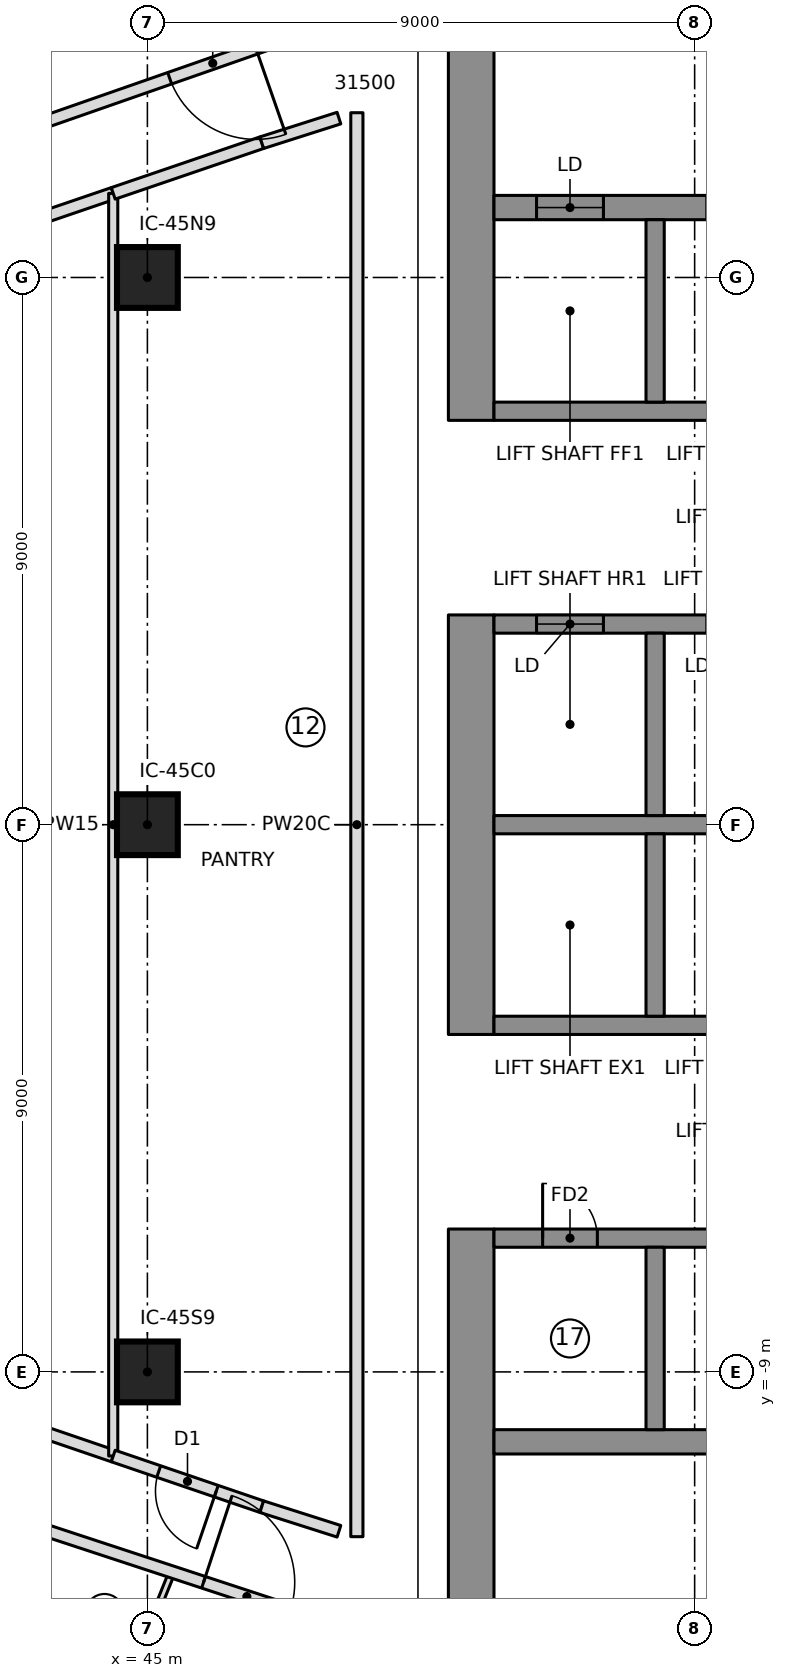
"""IFC4 building model, lengths in metres.
Left out: names, types, materials, properties, quantities, classifications, styles, units other than length and angle.
Written with IfcOpenShell. Run it as: python <this file> out.ifc"""

import sys

from ifc_helpers import new_model, si_unit, direction, frame, frame_2d, origin, origin_2d, place, context, subcontext, project, spatial, rectangle, extrude, element, fill, save


model = new_model("IFC4")
c1 = context("Model", 3, precision=1e-05, world=origin(), true_north=direction((0.0, 1.0)))
c2 = subcontext(c1, "Body", "Model", "MODEL_VIEW")
j1 = project(units=[si_unit("LENGTHUNIT", "METRE"), si_unit("PLANEANGLEUNIT", "RADIAN")], contexts=[c1])
p1 = place(None, origin())
s1 = spatial("IfcSite", under=j1, at=p1, CompositionType="ELEMENT")
p2 = place(p1, origin())
s2 = spatial("IfcBuilding", under=s1, at=p2, CompositionType="ELEMENT")
p3 = place(p2, frame((0.0, 0.0, 200.35)))
s3 = spatial("IfcBuildingStorey", under=s2, at=p3, CompositionType="ELEMENT", Elevation=200.35)
p4 = place(p3, frame((50.325, 6.65, 0.0), z_axis=(0.0, 0.0, 1.0), x_axis=(0.0, 1.0, 0.0)))
e1 = element("IfcWall", 1, at=p4, inside=s3, PredefinedType="SHEAR", context=c2, shape_type="SweptSolid", body=[
    extrude(rectangle(XDim=9.85, YDim=0.75, at=frame_2d((4.925, 0.0))), origin(), (0.0, 0.0, 1.0), 3.55),
])
p5 = place(p4, frame((6.5, 0.0, 0.0)))
e2 = element("IfcOpeningElement", 2, at=p5, cuts=e1, PredefinedType="OPENING", context=c2, shape_type="SweptSolid", body=[
    extrude(rectangle(XDim=1.1, YDim=2.1, at=frame_2d((0.55, 1.05))), frame((0.0, 0.385, 0.0), z_axis=(0.0, -1.0, 0.0), x_axis=(1.0, 0.0, 0.0)), (0.0, 0.0, 1.0), 0.77),
])
p6 = place(p3, frame((50.325, -3.45, 0.0), z_axis=(0.0, 0.0, 1.0), x_axis=(0.0, 1.0, 0.0)))
e3 = element("IfcWall", 3, at=p6, inside=s3, PredefinedType="SHEAR", context=c2, shape_type="SweptSolid", body=[
    extrude(rectangle(XDim=6.9, YDim=0.75, at=frame_2d((3.45, 0.0))), origin(), (0.0, 0.0, 1.0), 3.55),
])
p7 = place(p3, frame((50.325, -16.5, 0.0), z_axis=(0.0, 0.0, 1.0), x_axis=(0.0, 1.0, 0.0)))
e4 = element("IfcWall", 4, at=p7, inside=s3, PredefinedType="SHEAR", context=c2, shape_type="SweptSolid", body=[
    extrude(rectangle(XDim=9.85, YDim=0.75, at=frame_2d((4.925, 0.0))), origin(), (0.0, 0.0, 1.0), 3.55),
])
p8 = place(p7, frame((2.25, 0.0, 0.0)))
e5 = element("IfcOpeningElement", 5, at=p8, cuts=e4, PredefinedType="OPENING", context=c2, shape_type="SweptSolid", body=[
    extrude(rectangle(XDim=1.1, YDim=2.1, at=frame_2d((0.55, 1.05))), frame((0.0, 0.385, 0.0), z_axis=(0.0, -1.0, 0.0), x_axis=(1.0, 0.0, 0.0)), (0.0, 0.0, 1.0), 0.77),
])
p9 = place(p3, frame((50.7, 10.15, 0.0), z_axis=(0.0, 0.0, 1.0), x_axis=(1.0, 0.0, 0.0)))
e6 = element("IfcWall", 6, at=p9, inside=s3, PredefinedType="SHEAR", context=c2, shape_type="SweptSolid", body=[
    extrude(rectangle(XDim=13.02, YDim=0.4, at=frame_2d((6.51, 0.0))), origin(), (0.0, 0.0, 1.0), 3.55),
])
p10 = place(p9, frame((0.7, 0.0, 0.0)))
e7 = element("IfcOpeningElement", 7, at=p10, cuts=e6, PredefinedType="OPENING", context=c2, shape_type="SweptSolid", body=[
    extrude(rectangle(XDim=1.1, YDim=2.1, at=frame_2d((0.55, 1.05))), frame((0.0, 0.21, 0.0), z_axis=(0.0, -1.0, 0.0), x_axis=(1.0, 0.0, 0.0)), (0.0, 0.0, 1.0), 0.42),
])
p11 = place(p9, frame((3.5, 0.0, 0.0)))
e8 = element("IfcOpeningElement", 8, at=p11, cuts=e6, PredefinedType="OPENING", context=c2, shape_type="SweptSolid", body=[
    extrude(rectangle(XDim=1.1, YDim=2.1, at=frame_2d((0.55, 1.05))), frame((0.0, 0.21, 0.0), z_axis=(0.0, -1.0, 0.0), x_axis=(1.0, 0.0, 0.0)), (0.0, 0.0, 1.0), 0.42),
])
p12 = place(p3, frame((50.7, -10.15, 0.0), z_axis=(0.0, 0.0, 1.0), x_axis=(1.0, 0.0, 0.0)))
e9 = element("IfcWall", 9, at=p12, inside=s3, PredefinedType="SHEAR", context=c2, shape_type="SweptSolid", body=[
    extrude(rectangle(XDim=13.02, YDim=0.4, at=frame_2d((6.51, 0.0))), origin(), (0.0, 0.0, 1.0), 3.55),
])
p13 = place(p3, frame((50.7, 0.0, 0.0), z_axis=(0.0, 0.0, 1.0), x_axis=(1.0, 0.0, 0.0)))
e10 = element("IfcWall", 10, at=p13, inside=s3, PredefinedType="SHEAR", context=c2, shape_type="SweptSolid", body=[
    extrude(rectangle(XDim=10.9, YDim=0.3, at=frame_2d((5.45, 0.0))), origin(), (0.0, 0.0, 1.0), 3.55),
])
p14 = place(p3, frame((50.7, 3.3, 0.0), z_axis=(0.0, 0.0, 1.0), x_axis=(1.0, 0.0, 0.0)))
e11 = element("IfcWall", 11, at=p14, inside=s3, PredefinedType="SHEAR", context=c2, shape_type="SweptSolid", body=[
    extrude(rectangle(XDim=10.9, YDim=0.3, at=frame_2d((5.45, 0.0))), origin(), (0.0, 0.0, 1.0), 3.55),
])
p15 = place(p14, frame((0.7, 0.0, 0.0)))
e12 = element("IfcOpeningElement", 12, at=p15, cuts=e11, PredefinedType="OPENING", context=c2, shape_type="SweptSolid", body=[
    extrude(rectangle(XDim=1.1, YDim=2.1, at=frame_2d((0.55, 1.05))), frame((0.0, 0.16, 0.0), z_axis=(0.0, -1.0, 0.0), x_axis=(1.0, 0.0, 0.0)), (0.0, 0.0, 1.0), 0.32),
])
p16 = place(p14, frame((3.5, 0.0, 0.0)))
e13 = element("IfcOpeningElement", 13, at=p16, cuts=e11, PredefinedType="OPENING", context=c2, shape_type="SweptSolid", body=[
    extrude(rectangle(XDim=1.1, YDim=2.1, at=frame_2d((0.55, 1.05))), frame((0.0, 0.16, 0.0), z_axis=(0.0, -1.0, 0.0), x_axis=(1.0, 0.0, 0.0)), (0.0, 0.0, 1.0), 0.32),
])
p17 = place(p14, frame((6.3, 0.0, 0.0)))
e14 = element("IfcOpeningElement", 14, at=p17, cuts=e11, PredefinedType="OPENING", context=c2, shape_type="SweptSolid", body=[
    extrude(rectangle(XDim=1.1, YDim=2.1, at=frame_2d((0.55, 1.05))), frame((0.0, 0.16, 0.0), z_axis=(0.0, -1.0, 0.0), x_axis=(1.0, 0.0, 0.0)), (0.0, 0.0, 1.0), 0.32),
])
p18 = place(p14, frame((9.1, 0.0, 0.0)))
e15 = element("IfcOpeningElement", 15, at=p18, cuts=e11, PredefinedType="OPENING", context=c2, shape_type="SweptSolid", body=[
    extrude(rectangle(XDim=1.1, YDim=2.1, at=frame_2d((0.55, 1.05))), frame((0.0, 0.16, 0.0), z_axis=(0.0, -1.0, 0.0), x_axis=(1.0, 0.0, 0.0)), (0.0, 0.0, 1.0), 0.32),
])
p19 = place(p3, frame((50.7, 6.8, 0.0), z_axis=(0.0, 0.0, 1.0), x_axis=(1.0, 0.0, 0.0)))
e16 = element("IfcWall", 16, at=p19, inside=s3, PredefinedType="SHEAR", context=c2, shape_type="SweptSolid", body=[
    extrude(rectangle(XDim=10.9, YDim=0.3, at=frame_2d((5.45, 0.0))), origin(), (0.0, 0.0, 1.0), 3.55),
])
p20 = place(p19, frame((6.4, 0.0, 0.0)))
e17 = element("IfcOpeningElement", 17, at=p20, cuts=e16, PredefinedType="OPENING", context=c2, shape_type="SweptSolid", body=[
    extrude(rectangle(XDim=0.9, YDim=2.1, at=frame_2d((0.45, 1.05))), frame((0.0, 0.16, 0.0), z_axis=(0.0, -1.0, 0.0), x_axis=(1.0, 0.0, 0.0)), (0.0, 0.0, 1.0), 0.32),
])
p21 = place(p19, frame((9.2, 0.0, 0.0)))
e18 = element("IfcOpeningElement", 18, at=p21, cuts=e16, PredefinedType="OPENING", context=c2, shape_type="SweptSolid", body=[
    extrude(rectangle(XDim=0.9, YDim=2.1, at=frame_2d((0.45, 1.05))), frame((0.0, 0.16, 0.0), z_axis=(0.0, -1.0, 0.0), x_axis=(1.0, 0.0, 0.0)), (0.0, 0.0, 1.0), 0.32),
])
for number, where, z_axis, x_axis in (
    (19, (53.35, 0.15, 0.0), (0.0, 0.0, 1.0), (0.0, 1.0, 0.0)),
    (20, (53.35, 6.95, 0.0), (0.0, 0.0, 1.0), (0.0, 1.0, 0.0)),
):
    element("IfcWall", number, at=place(p3, frame(where, z_axis=z_axis, x_axis=x_axis)), inside=s3, PredefinedType="SHEAR", context=c2, shape_type="SweptSolid", body=[
        extrude(rectangle(XDim=3.0, YDim=0.3, at=frame_2d((1.5, 0.0))), origin(), (0.0, 0.0, 1.0), 3.55),
    ])
p22 = place(p3, frame((50.7, -3.3, 0.0), z_axis=(0.0, 0.0, 1.0), x_axis=(1.0, 0.0, 0.0)))
e21 = element("IfcWall", 21, at=p22, inside=s3, PredefinedType="SHEAR", context=c2, shape_type="SweptSolid", body=[
    extrude(rectangle(XDim=10.9, YDim=0.3, at=frame_2d((5.45, 0.0))), origin(), (0.0, 0.0, 1.0), 3.55),
])
p23 = place(p22, frame((9.1, 0.0, 0.0)))
e22 = element("IfcOpeningElement", 22, at=p23, cuts=e21, PredefinedType="OPENING", context=c2, shape_type="SweptSolid", body=[
    extrude(rectangle(XDim=1.1, YDim=2.1, at=frame_2d((0.55, 1.05))), frame((0.0, 0.16, 0.0), z_axis=(0.0, -1.0, 0.0), x_axis=(1.0, 0.0, 0.0)), (0.0, 0.0, 1.0), 0.32),
])
p24 = place(p3, frame((50.7, -6.8, 0.0), z_axis=(0.0, 0.0, 1.0), x_axis=(1.0, 0.0, 0.0)))
e23 = element("IfcWall", 23, at=p24, inside=s3, PredefinedType="SHEAR", context=c2, shape_type="SweptSolid", body=[
    extrude(rectangle(XDim=10.9, YDim=0.3, at=frame_2d((5.45, 0.0))), origin(), (0.0, 0.0, 1.0), 3.55),
])
p25 = place(p24, frame((6.3, 0.0, 0.0)))
e24 = element("IfcOpeningElement", 24, at=p25, cuts=e23, PredefinedType="OPENING", context=c2, shape_type="SweptSolid", body=[
    extrude(rectangle(XDim=1.1, YDim=2.1, at=frame_2d((0.55, 1.05))), frame((0.0, 0.16, 0.0), z_axis=(0.0, -1.0, 0.0), x_axis=(1.0, 0.0, 0.0)), (0.0, 0.0, 1.0), 0.32),
])
p26 = place(p24, frame((9.1, 0.0, 0.0)))
e25 = element("IfcOpeningElement", 25, at=p26, cuts=e23, PredefinedType="OPENING", context=c2, shape_type="SweptSolid", body=[
    extrude(rectangle(XDim=1.1, YDim=2.1, at=frame_2d((0.55, 1.05))), frame((0.0, 0.16, 0.0), z_axis=(0.0, -1.0, 0.0), x_axis=(1.0, 0.0, 0.0)), (0.0, 0.0, 1.0), 0.32),
])
p27 = place(p24, frame((0.8, 0.0, 0.0)))
e26 = element("IfcOpeningElement", 26, at=p27, cuts=e23, PredefinedType="OPENING", context=c2, shape_type="SweptSolid", body=[
    extrude(rectangle(XDim=0.9, YDim=2.1, at=frame_2d((0.45, 1.05))), frame((0.0, 0.16, 0.0), z_axis=(0.0, -1.0, 0.0), x_axis=(1.0, 0.0, 0.0)), (0.0, 0.0, 1.0), 0.32),
])
p28 = place(p24, frame((3.6, 0.0, 0.0)))
e27 = element("IfcOpeningElement", 27, at=p28, cuts=e23, PredefinedType="OPENING", context=c2, shape_type="SweptSolid", body=[
    extrude(rectangle(XDim=0.9, YDim=2.1, at=frame_2d((0.45, 1.05))), frame((0.0, 0.16, 0.0), z_axis=(0.0, -1.0, 0.0), x_axis=(1.0, 0.0, 0.0)), (0.0, 0.0, 1.0), 0.32),
])
for number, where, z_axis, x_axis in (
    (28, (53.35, -3.15, 0.0), (0.0, 0.0, 1.0), (0.0, 1.0, 0.0)),
    (29, (53.35, -9.95, 0.0), (0.0, 0.0, 1.0), (0.0, 1.0, 0.0)),
):
    element("IfcWall", number, at=place(p3, frame(where, z_axis=z_axis, x_axis=x_axis)), inside=s3, PredefinedType="SHEAR", context=c2, shape_type="SweptSolid", body=[
        extrude(rectangle(XDim=3.0, YDim=0.3, at=frame_2d((1.5, 0.0))), origin(), (0.0, 0.0, 1.0), 3.55),
    ])
for number, where, z_axis, x_axis in (
    (30, (45.0, -9.0, 0.0), (0.0, 0.0, 1.0), (1.0, 0.0, 0.0)),
    (31, (45.0, 0.0, 0.0), (0.0, 0.0, 1.0), (1.0, 0.0, 0.0)),
    (32, (45.0, 9.0, 0.0), (0.0, 0.0, 1.0), (1.0, 0.0, 0.0)),
):
    element("IfcColumn", number, at=place(p3, frame(where, z_axis=z_axis, x_axis=x_axis)), inside=s3, PredefinedType="COLUMN", context=c2, shape_type="SweptSolid", body=[
        extrude(rectangle(XDim=1.0, YDim=1.0, at=origin_2d()), origin(), (0.0, 0.0, 1.0), 3.55),
    ])
p29 = place(p3, frame((47.113, 12.886, 0.0), z_axis=(0.0, 0.0, 1.0), x_axis=(-0.944155939639, -0.329498955453, 0.0)))
e33 = element("IfcWall", 33, at=p29, inside=s3, PredefinedType="PARTITIONING", context=c2, shape_type="SweptSolid", body=[
    extrude(rectangle(XDim=8.622, YDim=0.2, at=frame_2d((4.311, 0.0))), origin(), (0.0, 0.0, 1.0), 3.25),
])
p30 = place(p29, frame((0.35, 0.0, 0.0)))
e34 = element("IfcOpeningElement", 34, at=p30, cuts=e33, PredefinedType="OPENING", context=c2, shape_type="SweptSolid", body=[
    extrude(rectangle(XDim=1.5, YDim=2.1, at=frame_2d((0.75, 1.05))), frame((0.0, 0.11, 0.0), z_axis=(0.0, -1.0, 0.0), x_axis=(1.0, 0.0, 0.0)), (0.0, 0.0, 1.0), 0.22),
])
p31 = place(p3, frame((45.395, -12.318, 0.0), z_axis=(0.0, 0.0, 1.0), x_axis=(-0.373917841166, -0.927461831052, 0.0)))
e35 = element("IfcWall", 35, at=p31, inside=s3, PredefinedType="PARTITIONING", context=c2, shape_type="SweptSolid", body=[
    extrude(rectangle(XDim=2.281, YDim=0.1, at=frame_2d((1.14, 0.0))), origin(), (0.0, 0.0, 1.0), 3.25),
])
for number, where, z_axis, x_axis in (
    (36, (42.984, 9.887, 0.0), (0.0, 0.0, 1.0), (0.946, 0.323, 0.0)),
    (37, (44.438, -10.383, 0.0), (0.0, 0.0, 1.0), (-0.946, 0.323, 0.0)),
):
    element("IfcWall", number, at=place(p3, frame(where, z_axis=z_axis, x_axis=x_axis)), inside=s3, PredefinedType="PARTITIONING", context=c2, shape_type="SweptSolid", body=[
        extrude(rectangle(XDim=1.536, YDim=0.2, at=frame_2d((0.768, 0.0))), origin(), (0.0, 0.0, 1.0), 3.25),
    ])
p32 = place(p3, frame((44.438, -10.383, 0.0), z_axis=(0.0, 0.0, 1.0), x_axis=(0.0, 1.0, 0.0)))
e38 = element("IfcWall", 38, at=p32, inside=s3, PredefinedType="PARTITIONING", context=c2, shape_type="SweptSolid", body=[
    extrude(rectangle(XDim=20.766, YDim=0.15, at=frame_2d((10.383, 0.0))), origin(), (0.0, 0.0, 1.0), 3.25),
])
p33 = place(p3, frame((46.881, -11.217, 0.0), z_axis=(0.0, 0.0, 1.0), x_axis=(-0.946427432629, 0.322916575554, 0.0)))
e39 = element("IfcWall", 39, at=p33, inside=s3, PredefinedType="PARTITIONING", context=c2, shape_type="SweptSolid", body=[
    extrude(rectangle(XDim=2.581, YDim=0.2, at=frame_2d((1.291, 0.0))), origin(), (0.0, 0.0, 1.0), 3.25),
])
p34 = place(p33, frame((0.791, 0.0, 0.0)))
e40 = element("IfcOpeningElement", 40, at=p34, cuts=e39, PredefinedType="OPENING", context=c2, shape_type="SweptSolid", body=[
    extrude(rectangle(XDim=1.0, YDim=2.1, at=frame_2d((0.5, 1.05))), frame((0.0, 0.11, 0.0), z_axis=(0.0, -1.0, 0.0), x_axis=(1.0, 0.0, 0.0)), (0.0, 0.0, 1.0), 0.22),
])
p35 = place(p3, frame((44.438, 10.383, 0.0), z_axis=(0.0, 0.0, 1.0), x_axis=(0.946427432629, 0.322916575554, 0.0)))
e41 = element("IfcWall", 41, at=p35, inside=s3, PredefinedType="PARTITIONING", context=c2, shape_type="SweptSolid", body=[
    extrude(rectangle(XDim=2.581, YDim=0.2, at=frame_2d((1.291, 0.0))), origin(), (0.0, 0.0, 1.0), 3.25),
])
p36 = place(p3, frame((43.026, -11.507, 0.0), z_axis=(0.0, 0.0, 1.0), x_axis=(0.949951949432, -0.312396052744, 0.0)))
e42 = element("IfcWall", 42, at=p36, inside=s3, PredefinedType="PARTITIONING", context=c2, shape_type="SweptSolid", body=[
    extrude(rectangle(XDim=5.394, YDim=0.2, at=frame_2d((2.697, 0.0))), origin(), (0.0, 0.0, 1.0), 3.25),
])
p37 = place(p36, frame((3.05, 0.0, 0.0)))
e43 = element("IfcOpeningElement", 43, at=p37, cuts=e42, PredefinedType="OPENING", context=c2, shape_type="SweptSolid", body=[
    extrude(rectangle(XDim=1.5, YDim=2.1, at=frame_2d((0.75, 1.05))), frame((0.0, 0.11, 0.0), z_axis=(0.0, -1.0, 0.0), x_axis=(1.0, 0.0, 0.0)), (0.0, 0.0, 1.0), 0.22),
])
for number, where, z_axis, x_axis in (
    (44, (46.881, 11.217, 0.0), (0.0, 0.0, 1.0), (0.953, 0.304, 0.0)),
    (45, (48.15, -11.621, 0.0), (0.0, 0.0, 1.0), (-0.953, 0.304, 0.0)),
):
    element("IfcWall", number, at=place(p3, frame(where, z_axis=z_axis, x_axis=x_axis)), inside=s3, PredefinedType="PARTITIONING", context=c2, shape_type="SweptSolid", body=[
        extrude(rectangle(XDim=1.332, YDim=0.2, at=frame_2d((0.666, 0.0))), origin(), (0.0, 0.0, 1.0), 3.25),
    ])
p38 = place(p3, frame((48.445, 11.71, 0.0), z_axis=(0.0, 0.0, 1.0), x_axis=(0.0, -1.0, 0.0)))
e46 = element("IfcWall", 46, at=p38, inside=s3, PredefinedType="PARTITIONING", context=c2, shape_type="SweptSolid", body=[
    extrude(rectangle(XDim=23.42, YDim=0.2, at=frame_2d((11.71, 0.0))), origin(), (0.0, 0.0, 1.0), 3.25),
])
p39 = place(p30, origin())
e47 = element("IfcDoor", 47, at=p39, inside=s3, OperationType="DOUBLE_DOOR_SINGLE_SWING", PredefinedType="DOOR", context=c2, shape_type="SweptSolid", body=[
    extrude(rectangle(XDim=1.5, YDim=2.1, at=frame_2d((0.75, 1.05))), frame((0.0, 0.025, 0.0), z_axis=(0.0, -1.0, 0.0), x_axis=(1.0, 0.0, 0.0)), (0.0, 0.0, 1.0), 0.05),
])
fill(e34, e47)
p40 = place(p37, origin())
e48 = element("IfcDoor", 48, at=p40, inside=s3, OperationType="DOUBLE_DOOR_SINGLE_SWING", PredefinedType="DOOR", context=c2, shape_type="SweptSolid", body=[
    extrude(rectangle(XDim=1.5, YDim=2.1, at=frame_2d((0.75, 1.05))), frame((0.0, 0.025, 0.0), z_axis=(0.0, -1.0, 0.0), x_axis=(1.0, 0.0, 0.0)), (0.0, 0.0, 1.0), 0.05),
])
fill(e43, e48)
p41 = place(p34, origin())
e49 = element("IfcDoor", 49, at=p41, inside=s3, OperationType="SINGLE_SWING_LEFT", PredefinedType="DOOR", context=c2, shape_type="SweptSolid", body=[
    extrude(rectangle(XDim=1.0, YDim=2.1, at=frame_2d((0.5, 1.05))), frame((0.0, 0.025, 0.0), z_axis=(0.0, -1.0, 0.0), x_axis=(1.0, 0.0, 0.0)), (0.0, 0.0, 1.0), 0.05),
])
fill(e40, e49)
p42 = place(p10, origin())
e50 = element("IfcDoor", 50, at=p42, inside=s3, OperationType="DOUBLE_DOOR_SLIDING", PredefinedType="DOOR", context=c2, shape_type="SweptSolid", body=[
    extrude(rectangle(XDim=1.1, YDim=2.1, at=frame_2d((0.55, 1.05))), frame((0.0, 0.025, 0.0), z_axis=(0.0, -1.0, 0.0), x_axis=(1.0, 0.0, 0.0)), (0.0, 0.0, 1.0), 0.05),
])
fill(e7, e50)
p43 = place(p15, origin())
e51 = element("IfcDoor", 51, at=p43, inside=s3, OperationType="DOUBLE_DOOR_SLIDING", PredefinedType="DOOR", context=c2, shape_type="SweptSolid", body=[
    extrude(rectangle(XDim=1.1, YDim=2.1, at=frame_2d((0.55, 1.05))), frame((0.0, 0.025, 0.0), z_axis=(0.0, -1.0, 0.0), x_axis=(1.0, 0.0, 0.0)), (0.0, 0.0, 1.0), 0.05),
])
fill(e12, e51)
p44 = place(p27, origin())
e52 = element("IfcDoor", 52, at=p44, inside=s3, OperationType="SINGLE_SWING_LEFT", PredefinedType="DOOR", context=c2, shape_type="SweptSolid", body=[
    extrude(rectangle(XDim=0.9, YDim=2.1, at=frame_2d((0.45, 1.05))), frame((0.0, 0.025, 0.0), z_axis=(0.0, -1.0, 0.0), x_axis=(1.0, 0.0, 0.0)), (0.0, 0.0, 1.0), 0.05),
])
fill(e26, e52)
save(model, sys.argv[1])
